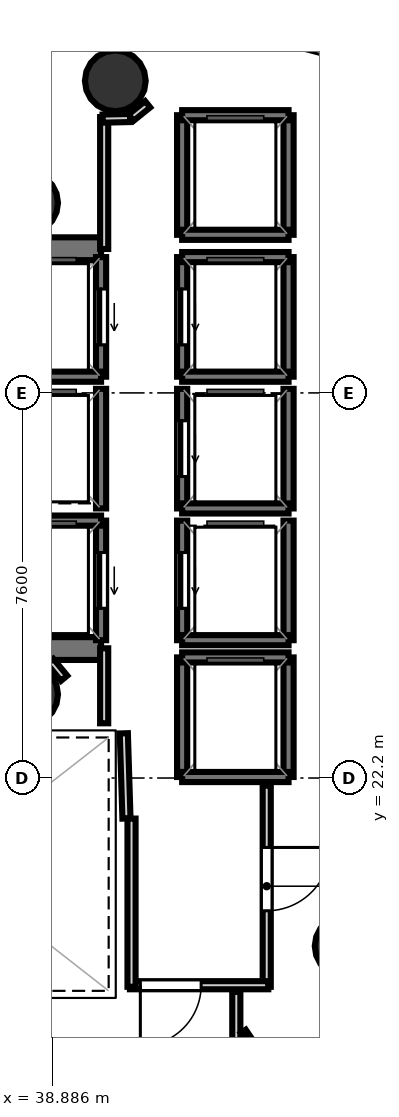
"""IFC4 building model, lengths in metres.
Left out: names, types, materials, properties, quantities, classifications, styles, units other than length and angle.
Written with IfcOpenShell. Run it as: python <this file> out.ifc"""

import sys

from ifc_helpers import new_model, si_unit, direction, frame, frame_2d, origin, origin_2d, place, context, subcontext, project, spatial, rectangle, hollow_circle, extrude, element, fill, save


model = new_model("IFC4")
c1 = context("Model", 3, precision=1e-05, world=origin(), true_north=direction((0.0, 1.0)))
c2 = subcontext(c1, "Body", "Model", "MODEL_VIEW")
j1 = project(units=[si_unit("LENGTHUNIT", "METRE"), si_unit("PLANEANGLEUNIT", "RADIAN")], contexts=[c1])
p1 = place(None, origin())
s1 = spatial("IfcSite", under=j1, at=p1, CompositionType="ELEMENT")
p2 = place(p1, origin())
s2 = spatial("IfcBuilding", under=s1, at=p2, CompositionType="ELEMENT")
p3 = place(p2, frame((0.0, 0.0, 189.2)))
s3 = spatial("IfcBuildingStorey", under=s2, at=p3, CompositionType="ELEMENT", Elevation=189.2)
p4 = place(p3, frame((29.33, 32.645, 0.0), z_axis=(0.0, 0.0, 1.0), x_axis=(1.0, 0.0, 0.0)))
e1 = element("IfcWall", 1, at=p4, inside=s3, PredefinedType="SHEAR", context=c2, shape_type="SweptSolid", body=[
    extrude(rectangle(XDim=10.52, YDim=0.45, at=frame_2d((5.26, 0.0))), origin(), (0.0, 0.0, 1.0), 3.52),
])
p5 = place(p4, frame((0.895, 0.0, 0.0)))
e2 = element("IfcOpeningElement", 2, at=p5, cuts=e1, PredefinedType="OPENING", context=c2, shape_type="SweptSolid", body=[
    extrude(rectangle(XDim=1.25, YDim=2.15, at=frame_2d((0.625, 1.075))), frame((0.0, 0.235, 0.0), z_axis=(0.0, -1.0, 0.0), x_axis=(1.0, 0.0, 0.0)), (0.0, 0.0, 1.0), 0.47),
])
p6 = place(p3, frame((29.33, 24.755, 0.0), z_axis=(0.0, 0.0, 1.0), x_axis=(1.0, 0.0, 0.0)))
e3 = element("IfcWall", 3, at=p6, inside=s3, PredefinedType="SHEAR", context=c2, shape_type="SweptSolid", body=[
    extrude(rectangle(XDim=10.52, YDim=0.45, at=frame_2d((5.26, 0.0))), origin(), (0.0, 0.0, 1.0), 3.52),
])
p7 = place(p6, frame((0.695, 0.0, 0.0)))
e4 = element("IfcOpeningElement", 4, at=p7, cuts=e3, PredefinedType="OPENING", context=c2, shape_type="SweptSolid", body=[
    extrude(rectangle(XDim=1.25, YDim=2.15, at=frame_2d((0.625, 1.075))), frame((0.0, 0.235, 0.0), z_axis=(0.0, -1.0, 0.0), x_axis=(1.0, 0.0, 0.0)), (0.0, 0.0, 1.0), 0.47),
])
for number, where, z_axis, x_axis in (
    (5, (38.4, 33.55, 0.0), (0.0, 0.0, 1.0), (1.0, 0.0, 0.0)),
    (6, (38.4, 23.85, 0.0), (0.0, 0.0, 1.0), (1.0, 0.0, 0.0)),
):
    element("IfcColumn", number, at=place(p3, frame(where, z_axis=z_axis, x_axis=x_axis)), inside=s3, PredefinedType="COLUMN", context=c2, shape_type="SweptSolid", body=[
        extrude(hollow_circle(Radius=0.6, WallThickness=0.03, at=origin_2d()), origin(), (0.0, 0.0, 1.0), 3.7),
    ])
for number, where, z_axis, x_axis in (
    (7, (40.131, 35.958, -0.23), (0.0, 0.0, 1.0), (1.0, 0.0, 0.0)),
    (8, (44.667, 18.883, -0.23), (0.0, 0.0, 1.0), (1.0, 0.0, 0.0)),
):
    element("IfcColumn", number, at=place(p3, frame(where, z_axis=z_axis, x_axis=x_axis)), inside=s3, PredefinedType="COLUMN", context=c2, shape_type="SweptSolid", body=[
        extrude(hollow_circle(Radius=0.6, WallThickness=0.03, at=origin_2d()), origin(), (0.0, 0.0, 1.0), 3.93),
    ])
p8 = place(p3, frame((39.85, 30.12, 0.0), z_axis=(0.0, 0.0, 1.0), x_axis=(0.0, 1.0, 0.0)))
e9 = element("IfcWall", 9, at=p8, inside=s3, PredefinedType="SOLIDWALL", context=c2, shape_type="SweptSolid", body=[
    extrude(rectangle(XDim=2.36, YDim=0.2, at=frame_2d((1.18, 0.0))), origin(), (0.0, 0.0, 1.0), 3.52),
])
p9 = place(p8, frame((0.63, 0.0, 0.0)))
e10 = element("IfcOpeningElement", 10, at=p9, cuts=e9, PredefinedType="OPENING", context=c2, shape_type="SweptSolid", body=[
    extrude(rectangle(XDim=1.1, YDim=2.15, at=frame_2d((0.55, 1.075))), frame((0.0, 0.11, 0.0), z_axis=(0.0, -1.0, 0.0), x_axis=(1.0, 0.0, 0.0)), (0.0, 0.0, 1.0), 0.22),
])
p10 = place(p3, frame((37.75, 30.12, 0.0), z_axis=(0.0, 0.0, 1.0), x_axis=(1.0, 0.0, 0.0)))
e11 = element("IfcWall", 11, at=p10, inside=s3, PredefinedType="SOLIDWALL", context=c2, shape_type="SweptSolid", body=[
    extrude(rectangle(XDim=2.1, YDim=0.2, at=frame_2d((1.05, 0.0))), origin(), (0.0, 0.0, 1.0), 3.52),
])
p11 = place(p3, frame((39.85, 24.92, 0.0), z_axis=(0.0, 0.0, 1.0), x_axis=(0.0, 1.0, 0.0)))
e12 = element("IfcWall", 12, at=p11, inside=s3, PredefinedType="SOLIDWALL", context=c2, shape_type="SweptSolid", body=[
    extrude(rectangle(XDim=2.36, YDim=0.2, at=frame_2d((1.18, 0.0))), origin(), (0.0, 0.0, 1.0), 3.52),
])
p12 = place(p11, frame((0.63, 0.0, 0.0)))
e13 = element("IfcOpeningElement", 13, at=p12, cuts=e12, PredefinedType="OPENING", context=c2, shape_type="SweptSolid", body=[
    extrude(rectangle(XDim=1.1, YDim=2.15, at=frame_2d((0.55, 1.075))), frame((0.0, 0.11, 0.0), z_axis=(0.0, -1.0, 0.0), x_axis=(1.0, 0.0, 0.0)), (0.0, 0.0, 1.0), 0.22),
])
p13 = place(p3, frame((37.75, 27.28, 0.0), z_axis=(0.0, 0.0, 1.0), x_axis=(1.0, 0.0, 0.0)))
e14 = element("IfcWall", 14, at=p13, inside=s3, PredefinedType="SOLIDWALL", context=c2, shape_type="SweptSolid", body=[
    extrude(rectangle(XDim=2.1, YDim=0.2, at=frame_2d((1.05, 0.0))), origin(), (0.0, 0.0, 1.0), 3.52),
])
p14 = place(p3, frame((43.55, 30.12, 0.0), z_axis=(0.0, 0.0, 1.0), x_axis=(0.0, 1.0, 0.0)))
e15 = element("IfcWall", 15, at=p14, inside=s3, PredefinedType="SOLIDWALL", context=c2, shape_type="SweptSolid", body=[
    extrude(rectangle(XDim=2.36, YDim=0.2, at=frame_2d((1.18, 0.0))), origin(), (0.0, 0.0, 1.0), 3.52),
])
p15 = place(p3, frame((41.45, 30.12, 0.0), z_axis=(0.0, 0.0, 1.0), x_axis=(0.0, 1.0, 0.0)))
e16 = element("IfcWall", 16, at=p15, inside=s3, PredefinedType="SOLIDWALL", context=c2, shape_type="SweptSolid", body=[
    extrude(rectangle(XDim=2.36, YDim=0.2, at=frame_2d((1.18, 0.0))), origin(), (0.0, 0.0, 1.0), 3.52),
])
p16 = place(p15, frame((0.63, 0.0, 0.0)))
e17 = element("IfcOpeningElement", 17, at=p16, cuts=e16, PredefinedType="OPENING", context=c2, shape_type="SweptSolid", body=[
    extrude(rectangle(XDim=1.1, YDim=2.15, at=frame_2d((0.55, 1.075))), frame((0.0, 0.11, 0.0), z_axis=(0.0, -1.0, 0.0), x_axis=(1.0, 0.0, 0.0)), (0.0, 0.0, 1.0), 0.22),
])
for number, where, z_axis, x_axis in (
    (18, (41.45, 32.48, 0.0), (0.0, 0.0, 1.0), (1.0, 0.0, 0.0)),
    (19, (41.45, 30.12, 0.0), (0.0, 0.0, 1.0), (1.0, 0.0, 0.0)),
):
    element("IfcWall", number, at=place(p3, frame(where, z_axis=z_axis, x_axis=x_axis)), inside=s3, PredefinedType="SOLIDWALL", context=c2, shape_type="SweptSolid", body=[
        extrude(rectangle(XDim=2.1, YDim=0.2, at=frame_2d((1.05, 0.0))), origin(), (0.0, 0.0, 1.0), 3.52),
    ])
p17 = place(p3, frame((43.55, 27.52, 0.0), z_axis=(0.0, 0.0, 1.0), x_axis=(0.0, 1.0, 0.0)))
e20 = element("IfcWall", 20, at=p17, inside=s3, PredefinedType="SOLIDWALL", context=c2, shape_type="SweptSolid", body=[
    extrude(rectangle(XDim=2.36, YDim=0.2, at=frame_2d((1.18, 0.0))), origin(), (0.0, 0.0, 1.0), 3.52),
])
p18 = place(p3, frame((41.45, 27.52, 0.0), z_axis=(0.0, 0.0, 1.0), x_axis=(0.0, 1.0, 0.0)))
e21 = element("IfcWall", 21, at=p18, inside=s3, PredefinedType="SOLIDWALL", context=c2, shape_type="SweptSolid", body=[
    extrude(rectangle(XDim=2.36, YDim=0.2, at=frame_2d((1.18, 0.0))), origin(), (0.0, 0.0, 1.0), 3.52),
])
p19 = place(p18, frame((0.63, 0.0, 0.0)))
e22 = element("IfcOpeningElement", 22, at=p19, cuts=e21, PredefinedType="OPENING", context=c2, shape_type="SweptSolid", body=[
    extrude(rectangle(XDim=1.1, YDim=2.15, at=frame_2d((0.55, 1.075))), frame((0.0, 0.11, 0.0), z_axis=(0.0, -1.0, 0.0), x_axis=(1.0, 0.0, 0.0)), (0.0, 0.0, 1.0), 0.22),
])
p20 = place(p3, frame((41.45, 27.52, 0.0), z_axis=(0.0, 0.0, 1.0), x_axis=(1.0, 0.0, 0.0)))
e23 = element("IfcWall", 23, at=p20, inside=s3, PredefinedType="SOLIDWALL", context=c2, shape_type="SweptSolid", body=[
    extrude(rectangle(XDim=2.1, YDim=0.2, at=frame_2d((1.05, 0.0))), origin(), (0.0, 0.0, 1.0), 3.52),
])
p21 = place(p3, frame((43.55, 24.92, 0.0), z_axis=(0.0, 0.0, 1.0), x_axis=(0.0, 1.0, 0.0)))
e24 = element("IfcWall", 24, at=p21, inside=s3, PredefinedType="SOLIDWALL", context=c2, shape_type="SweptSolid", body=[
    extrude(rectangle(XDim=2.36, YDim=0.2, at=frame_2d((1.18, 0.0))), origin(), (0.0, 0.0, 1.0), 3.52),
])
p22 = place(p3, frame((41.45, 24.92, 0.0), z_axis=(0.0, 0.0, 1.0), x_axis=(0.0, 1.0, 0.0)))
e25 = element("IfcWall", 25, at=p22, inside=s3, PredefinedType="SOLIDWALL", context=c2, shape_type="SweptSolid", body=[
    extrude(rectangle(XDim=2.36, YDim=0.2, at=frame_2d((1.18, 0.0))), origin(), (0.0, 0.0, 1.0), 3.52),
])
p23 = place(p22, frame((0.63, 0.0, 0.0)))
e26 = element("IfcOpeningElement", 26, at=p23, cuts=e25, PredefinedType="OPENING", context=c2, shape_type="SweptSolid", body=[
    extrude(rectangle(XDim=1.1, YDim=2.15, at=frame_2d((0.55, 1.075))), frame((0.0, 0.11, 0.0), z_axis=(0.0, -1.0, 0.0), x_axis=(1.0, 0.0, 0.0)), (0.0, 0.0, 1.0), 0.22),
])
p24 = place(p3, frame((41.45, 24.92, 0.0), z_axis=(0.0, 0.0, 1.0), x_axis=(1.0, 0.0, 0.0)))
e27 = element("IfcWall", 27, at=p24, inside=s3, PredefinedType="SOLIDWALL", context=c2, shape_type="SweptSolid", body=[
    extrude(rectangle(XDim=2.1, YDim=0.2, at=frame_2d((1.05, 0.0))), origin(), (0.0, 0.0, 1.0), 3.52),
])
p25 = place(p3, frame((39.85, 27.52, 0.0), z_axis=(0.0, 0.0, 1.0), x_axis=(0.0, 1.0, 0.0)))
e28 = element("IfcWall", 28, at=p25, inside=s3, PredefinedType="SOLIDWALL", context=c2, shape_type="SweptSolid", body=[
    extrude(rectangle(XDim=2.36, YDim=0.2, at=frame_2d((1.18, 0.0))), origin(), (0.0, 0.0, 1.0), 3.52),
])
for number, where, z_axis, x_axis in (
    (29, (43.55, 22.22, 0.0), (0.0, 0.0, 1.0), (0.0, 1.0, 0.0)),
    (30, (41.45, 22.22, 0.0), (0.0, 0.0, 1.0), (0.0, 1.0, 0.0)),
):
    element("IfcWall", number, at=place(p3, frame(where, z_axis=z_axis, x_axis=x_axis)), inside=s3, PredefinedType="SOLIDWALL", context=c2, shape_type="SweptSolid", body=[
        extrude(rectangle(XDim=2.36, YDim=0.2, at=frame_2d((1.18, 0.0))), origin(), (0.0, 0.0, 1.0), 3.52),
    ])
for number, where, z_axis, x_axis in (
    (31, (41.45, 24.58, 0.0), (0.0, 0.0, 1.0), (1.0, 0.0, 0.0)),
    (32, (41.45, 22.22, 0.0), (0.0, 0.0, 1.0), (1.0, 0.0, 0.0)),
):
    element("IfcWall", number, at=place(p3, frame(where, z_axis=z_axis, x_axis=x_axis)), inside=s3, PredefinedType="SOLIDWALL", context=c2, shape_type="SweptSolid", body=[
        extrude(rectangle(XDim=2.1, YDim=0.2, at=frame_2d((1.05, 0.0))), origin(), (0.0, 0.0, 1.0), 3.52),
    ])
for number, where, z_axis, x_axis in (
    (33, (43.55, 32.92, 0.0), (0.0, 0.0, 1.0), (0.0, 1.0, 0.0)),
    (34, (41.45, 32.92, 0.0), (0.0, 0.0, 1.0), (0.0, 1.0, 0.0)),
):
    element("IfcWall", number, at=place(p3, frame(where, z_axis=z_axis, x_axis=x_axis)), inside=s3, PredefinedType="SOLIDWALL", context=c2, shape_type="SweptSolid", body=[
        extrude(rectangle(XDim=2.36, YDim=0.2, at=frame_2d((1.18, 0.0))), origin(), (0.0, 0.0, 1.0), 3.52),
    ])
for number, where, z_axis, x_axis in (
    (35, (41.45, 35.28, 0.0), (0.0, 0.0, 1.0), (1.0, 0.0, 0.0)),
    (36, (41.45, 32.92, 0.0), (0.0, 0.0, 1.0), (1.0, 0.0, 0.0)),
):
    element("IfcWall", number, at=place(p3, frame(where, z_axis=z_axis, x_axis=x_axis)), inside=s3, PredefinedType="SOLIDWALL", context=c2, shape_type="SweptSolid", body=[
        extrude(rectangle(XDim=2.1, YDim=0.2, at=frame_2d((1.05, 0.0))), origin(), (0.0, 0.0, 1.0), 3.52),
    ])
p26 = place(p3, frame((40.351, 21.401, 0.0), z_axis=(0.0, 0.0, 1.0), x_axis=(-0.031058045979, 0.999517582527, 0.0)))
e37 = element("IfcWall", 37, at=p26, inside=s3, PredefinedType="PARTITIONING", context=c2, shape_type="SweptSolid", body=[
    extrude(rectangle(XDim=1.682, YDim=0.16, at=frame_2d((0.841, 0.0))), origin(), (0.0, 0.0, 1.0), 2.84),
])
p27 = place(p3, frame((39.911, 23.28, 0.0), z_axis=(0.0, 0.0, 1.0), x_axis=(0.0, 1.0, 0.0)))
e38 = element("IfcWall", 38, at=p27, inside=s3, PredefinedType="PARTITIONING", context=c2, shape_type="SweptSolid", body=[
    extrude(rectangle(XDim=1.48, YDim=0.16, at=frame_2d((0.74, 0.0))), origin(), (0.0, 0.0, 1.0), 2.84),
])
p28 = place(p3, frame((39.911, 32.64, 0.0), z_axis=(0.0, 0.0, 1.0), x_axis=(0.0, 1.0, 0.0)))
e39 = element("IfcWall", 39, at=p28, inside=s3, PredefinedType="PARTITIONING", context=c2, shape_type="SweptSolid", body=[
    extrude(rectangle(XDim=2.604, YDim=0.16, at=frame_2d((1.302, 0.0))), origin(), (0.0, 0.0, 1.0), 2.84),
])
p29 = place(p3, frame((39.881, 35.213, 0.0), z_axis=(0.0, 0.0, 1.0), x_axis=(0.999756500784, 0.02206669754, 0.0)))
e40 = element("IfcWall", 40, at=p29, inside=s3, PredefinedType="PARTITIONING", context=c2, shape_type="SweptSolid", body=[
    extrude(rectangle(XDim=0.542, YDim=0.16, at=frame_2d((0.271, 0.0))), origin(), (0.0, 0.0, 1.0), 2.84),
])
p30 = place(p3, frame((40.441, 35.232, 0.0), z_axis=(0.0, 0.0, 1.0), x_axis=(0.778714564707, 0.627378376033, 0.0)))
e41 = element("IfcWall", 41, at=p30, inside=s3, PredefinedType="PARTITIONING", context=c2, shape_type="SweptSolid", body=[
    extrude(rectangle(XDim=0.421, YDim=0.16, at=frame_2d((0.21, 0.0))), origin(), (0.0, 0.0, 1.0), 2.84),
])
p31 = place(p3, frame((43.119, 22.05, 0.0), z_axis=(0.0, 0.0, 1.0), x_axis=(0.0, -1.0, 0.0)))
e42 = element("IfcWall", 42, at=p31, inside=s3, PredefinedType="PARTITIONING", context=c2, shape_type="SweptSolid", body=[
    extrude(rectangle(XDim=3.97, YDim=0.16, at=frame_2d((1.985, 0.0))), origin(), (0.0, 0.0, 1.0), 2.84),
])
p32 = place(p31, frame((1.22, 0.0, 0.0)))
e43 = element("IfcOpeningElement", 43, at=p32, cuts=e42, PredefinedType="OPENING", context=c2, shape_type="SweptSolid", body=[
    extrude(rectangle(XDim=1.25, YDim=2.2, at=frame_2d((0.625, 1.1))), frame((0.0, 0.09, 0.0), z_axis=(0.0, -1.0, 0.0), x_axis=(1.0, 0.0, 0.0)), (0.0, 0.0, 1.0), 0.18),
])
p33 = place(p3, frame((43.15, 18.111, 0.0), z_axis=(0.0, 0.0, 1.0), x_axis=(-1.0, 0.0, 0.0)))
e44 = element("IfcWall", 44, at=p33, inside=s3, PredefinedType="PARTITIONING", context=c2, shape_type="SweptSolid", body=[
    extrude(rectangle(XDim=2.73, YDim=0.16, at=frame_2d((1.365, 0.0))), origin(), (0.0, 0.0, 1.0), 2.84),
])
p34 = place(p33, frame((1.325, 0.0, 0.0)))
e45 = element("IfcOpeningElement", 45, at=p34, cuts=e44, PredefinedType="OPENING", context=c2, shape_type="SweptSolid", body=[
    extrude(rectangle(XDim=1.2, YDim=2.15, at=frame_2d((0.6, 1.075))), frame((0.0, 0.09, 0.0), z_axis=(0.0, -1.0, 0.0), x_axis=(1.0, 0.0, 0.0)), (0.0, 0.0, 1.0), 0.18),
])
p35 = place(p3, frame((40.451, 18.08, 0.0), z_axis=(0.0, 0.0, 1.0), x_axis=(0.0, 1.0, 0.0)))
e46 = element("IfcWall", 46, at=p35, inside=s3, PredefinedType="PARTITIONING", context=c2, shape_type="SweptSolid", body=[
    extrude(rectangle(XDim=3.32, YDim=0.16, at=frame_2d((1.66, 0.0))), origin(), (0.0, 0.0, 1.0), 2.84),
])
p36 = place(p3, frame((39.121, 24.17, 0.0), z_axis=(0.0, 0.0, 1.0), x_axis=(-0.638008265708, 0.770029514296, 0.0)))
e47 = element("IfcWall", 47, at=p36, inside=s3, PredefinedType="PARTITIONING", context=c2, shape_type="SweptSolid", body=[
    extrude(rectangle(XDim=0.431, YDim=0.16, at=frame_2d((0.215, 0.0))), origin(), (0.0, 0.0, 1.0), 2.84),
])
p37 = place(p3, frame((42.519, 17.98, 0.0), z_axis=(0.0, 0.0, 1.0), x_axis=(0.0, -1.0, 0.0)))
e48 = element("IfcWall", 48, at=p37, inside=s3, PredefinedType="PARTITIONING", context=c2, shape_type="SweptSolid", body=[
    extrude(rectangle(XDim=2.987, YDim=0.16, at=frame_2d((1.494, 0.0))), origin(), (0.0, 0.0, 1.0), 2.84),
])
p38 = place(p3, frame((43.64, 15.739, 0.0), z_axis=(0.0, 0.0, 1.0), x_axis=(-0.558754040284, 0.829333420565, 0.0)))
e49 = element("IfcWall", 49, at=p38, inside=s3, PredefinedType="PARTITIONING", context=c2, shape_type="SweptSolid", body=[
    extrude(rectangle(XDim=1.762, YDim=0.12, at=frame_2d((0.881, 0.0))), origin(), (0.0, 0.0, 1.0), 2.84),
])
p39 = place(p9, origin())
e50 = element("IfcDoor", 50, at=p39, inside=s3, OperationType="SLIDING_TO_LEFT", PredefinedType="DOOR", context=c2, shape_type="SweptSolid", body=[
    extrude(rectangle(XDim=1.1, YDim=2.15, at=frame_2d((0.55, 1.075))), frame((0.0, 0.025, 0.0), z_axis=(0.0, -1.0, 0.0), x_axis=(1.0, 0.0, 0.0)), (0.0, 0.0, 1.0), 0.05),
])
fill(e10, e50)
p40 = place(p12, origin())
e51 = element("IfcDoor", 51, at=p40, inside=s3, OperationType="SLIDING_TO_LEFT", PredefinedType="DOOR", context=c2, shape_type="SweptSolid", body=[
    extrude(rectangle(XDim=1.1, YDim=2.15, at=frame_2d((0.55, 1.075))), frame((0.0, 0.025, 0.0), z_axis=(0.0, -1.0, 0.0), x_axis=(1.0, 0.0, 0.0)), (0.0, 0.0, 1.0), 0.05),
])
fill(e13, e51)
p41 = place(p16, origin())
e52 = element("IfcDoor", 52, at=p41, inside=s3, OperationType="SLIDING_TO_LEFT", PredefinedType="DOOR", context=c2, shape_type="SweptSolid", body=[
    extrude(rectangle(XDim=1.1, YDim=2.15, at=frame_2d((0.55, 1.075))), frame((0.0, 0.025, 0.0), z_axis=(0.0, -1.0, 0.0), x_axis=(1.0, 0.0, 0.0)), (0.0, 0.0, 1.0), 0.05),
])
fill(e17, e52)
p42 = place(p19, origin())
e53 = element("IfcDoor", 53, at=p42, inside=s3, OperationType="SLIDING_TO_LEFT", PredefinedType="DOOR", context=c2, shape_type="SweptSolid", body=[
    extrude(rectangle(XDim=1.1, YDim=2.15, at=frame_2d((0.55, 1.075))), frame((0.0, 0.025, 0.0), z_axis=(0.0, -1.0, 0.0), x_axis=(1.0, 0.0, 0.0)), (0.0, 0.0, 1.0), 0.05),
])
fill(e22, e53)
p43 = place(p23, origin())
e54 = element("IfcDoor", 54, at=p43, inside=s3, OperationType="SLIDING_TO_LEFT", PredefinedType="DOOR", context=c2, shape_type="SweptSolid", body=[
    extrude(rectangle(XDim=1.1, YDim=2.15, at=frame_2d((0.55, 1.075))), frame((0.0, 0.025, 0.0), z_axis=(0.0, -1.0, 0.0), x_axis=(1.0, 0.0, 0.0)), (0.0, 0.0, 1.0), 0.05),
])
fill(e26, e54)
p44 = place(p34, origin())
e55 = element("IfcDoor", 55, at=p44, inside=s3, OperationType="SINGLE_SWING_RIGHT", PredefinedType="DOOR", context=c2, shape_type="SweptSolid", body=[
    extrude(rectangle(XDim=1.2, YDim=2.15, at=frame_2d((0.6, 1.075))), frame((0.0, 0.025, 0.0), z_axis=(0.0, -1.0, 0.0), x_axis=(1.0, 0.0, 0.0)), (0.0, 0.0, 1.0), 0.05),
])
fill(e45, e55)
p45 = place(p32, origin())
e56 = element("IfcDoor", 56, at=p45, inside=s3, OperationType="SINGLE_SWING_LEFT", PredefinedType="DOOR", context=c2, shape_type="SweptSolid", body=[
    extrude(rectangle(XDim=1.25, YDim=2.2, at=frame_2d((0.625, 1.1))), frame((0.0, 0.025, 0.0), z_axis=(0.0, -1.0, 0.0), x_axis=(1.0, 0.0, 0.0)), (0.0, 0.0, 1.0), 0.05),
])
fill(e43, e56)
save(model, sys.argv[1])
